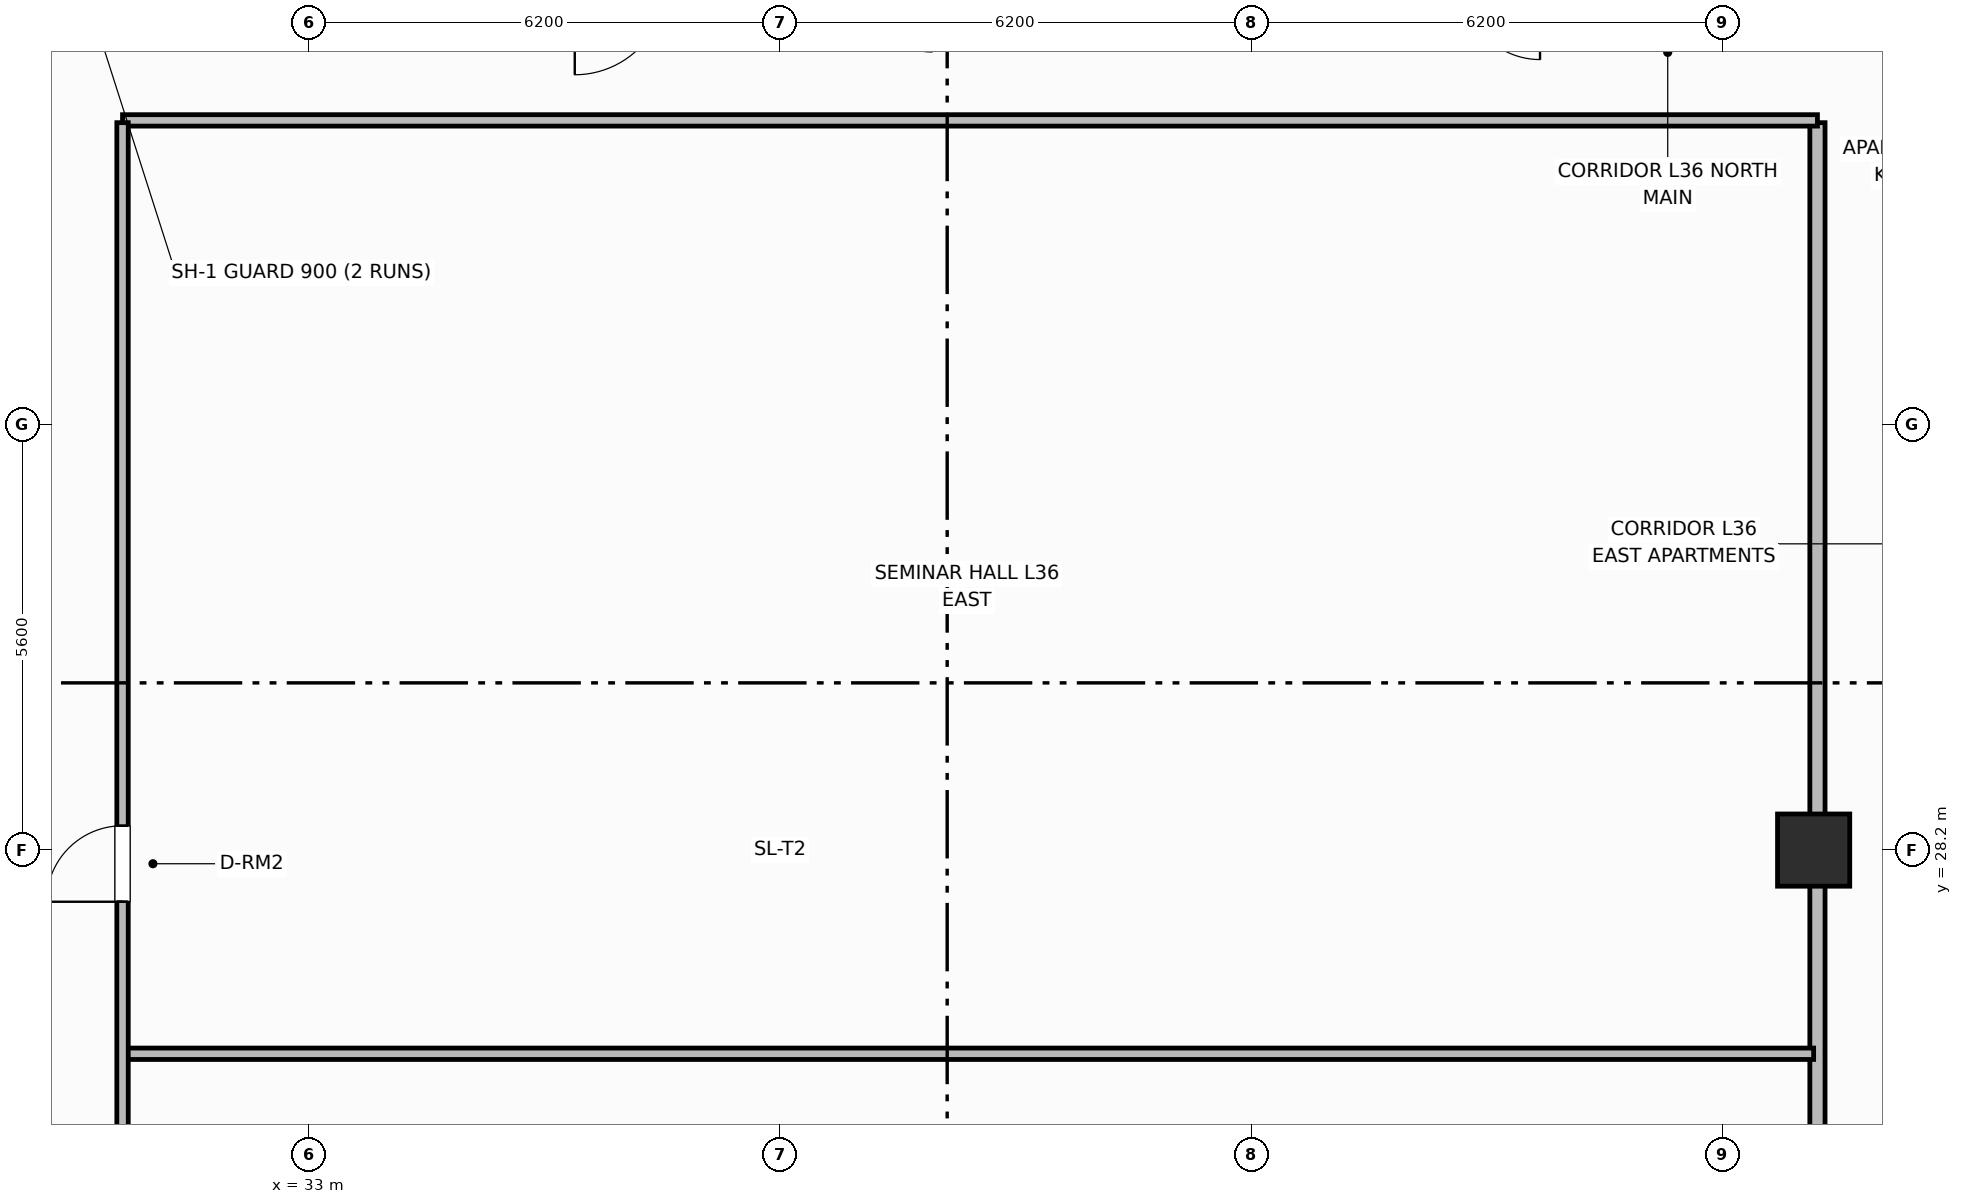
"""IFC4 building model, lengths in metres.
Left out: names, types, materials, properties, quantities, classifications, styles, units other than length and angle.
Written with IfcOpenShell. Run it as: python <this file> out.ifc"""

import sys

from ifc_helpers import new_model, si_unit, direction, frame, frame_2d, origin, origin_2d, place, context, subcontext, project, spatial, rectangle, extrude, element, fill, save


model = new_model("IFC4")
c1 = context("Model", 3, precision=1e-05, world=origin(), true_north=direction((0.0, 1.0)))
c2 = subcontext(c1, "Body", "Model", "MODEL_VIEW")
j1 = project(units=[si_unit("LENGTHUNIT", "METRE"), si_unit("PLANEANGLEUNIT", "RADIAN")], contexts=[c1])
p1 = place(None, origin())
s1 = spatial("IfcSite", under=j1, at=p1, CompositionType="ELEMENT")
p2 = place(p1, origin())
s2 = spatial("IfcBuilding", under=s1, at=p2, CompositionType="ELEMENT")
p3 = place(p2, frame((0.0, 0.0, 147.8)))
s3 = spatial("IfcBuildingStorey", under=s2, at=p3, CompositionType="ELEMENT", Elevation=147.8)
p4 = place(p3, frame((52.8, 28.2, 0.0), z_axis=(0.0, 0.0, 1.0), x_axis=(1.0, 0.0, 0.0)))
e1 = element("IfcColumn", 1, at=p4, inside=s3, PredefinedType="COLUMN", context=c2, shape_type="SweptSolid", body=[
    extrude(rectangle(XDim=0.95, YDim=0.95, at=origin_2d()), origin(), (0.0, 0.0, 1.0), 3.7),
])
p5 = place(p3, frame((52.85, 18.63, 0.0), z_axis=(0.0, 0.0, 1.0), x_axis=(0.0, 1.0, 0.0)))
e2 = element("IfcWall", 2, at=p5, inside=s3, PredefinedType="PARTITIONING", context=c2, shape_type="SweptSolid", body=[
    extrude(rectangle(XDim=19.14, YDim=0.2, at=frame_2d((9.57, 0.0))), origin(), (0.0, 0.0, 1.0), 2.55),
])
p6 = place(p3, frame((30.55, 37.8, 0.0), z_axis=(0.0, 0.0, 1.0), x_axis=(1.0, 0.0, 0.0)))
e3 = element("IfcWall", 3, at=p6, inside=s3, PredefinedType="PARTITIONING", context=c2, shape_type="SweptSolid", body=[
    extrude(rectangle(XDim=22.3, YDim=0.15, at=frame_2d((11.15, 0.0))), origin(), (0.0, 0.0, 1.0), 2.55),
])
p7 = place(p3, frame((30.58, 25.521, 0.0), z_axis=(0.0, 0.0, 1.0), x_axis=(1.0, 0.0, 0.0)))
e4 = element("IfcWall", 4, at=p7, inside=s3, PredefinedType="PARTITIONING", context=c2, shape_type="SweptSolid", body=[
    extrude(rectangle(XDim=22.22, YDim=0.15, at=frame_2d((11.11, 0.0))), origin(), (0.0, 0.0, 1.0), 2.55),
])
p8 = place(p3, frame((30.55, 18.63, 0.0), z_axis=(0.0, 0.0, 1.0), x_axis=(0.0, 1.0, 0.0)))
e5 = element("IfcWall", 5, at=p8, inside=s3, PredefinedType="PARTITIONING", context=c2, shape_type="SweptSolid", body=[
    extrude(rectangle(XDim=19.14, YDim=0.15, at=frame_2d((9.57, 0.0))), origin(), (0.0, 0.0, 1.0), 2.55),
])
p9 = place(p8, frame((2.4, 0.0, 0.0)))
e6 = element("IfcOpeningElement", 6, at=p9, cuts=e5, PredefinedType="OPENING", context=c2, shape_type="SweptSolid", body=[
    extrude(rectangle(XDim=1.0, YDim=2.15, at=frame_2d((0.5, 1.075))), frame((0.0, 0.085, 0.0), z_axis=(0.0, -1.0, 0.0), x_axis=(1.0, 0.0, 0.0)), (0.0, 0.0, 1.0), 0.17),
])
p10 = place(p8, frame((8.89, 0.0, 0.0)))
e7 = element("IfcOpeningElement", 7, at=p10, cuts=e5, PredefinedType="OPENING", context=c2, shape_type="SweptSolid", body=[
    extrude(rectangle(XDim=1.0, YDim=2.15, at=frame_2d((0.5, 1.075))), frame((0.0, 0.085, 0.0), z_axis=(0.0, -1.0, 0.0), x_axis=(1.0, 0.0, 0.0)), (0.0, 0.0, 1.0), 0.17),
])
p11 = place(p10, origin())
e8 = element("IfcDoor", 8, at=p11, inside=s3, OperationType="SINGLE_SWING_LEFT", PredefinedType="DOOR", context=c2, shape_type="SweptSolid", body=[
    extrude(rectangle(XDim=1.0, YDim=2.15, at=frame_2d((0.5, 1.075))), frame((0.0, 0.025, 0.0), z_axis=(0.0, -1.0, 0.0), x_axis=(1.0, 0.0, 0.0)), (0.0, 0.0, 1.0), 0.05),
])
fill(e7, e8)
save(model, sys.argv[1])
